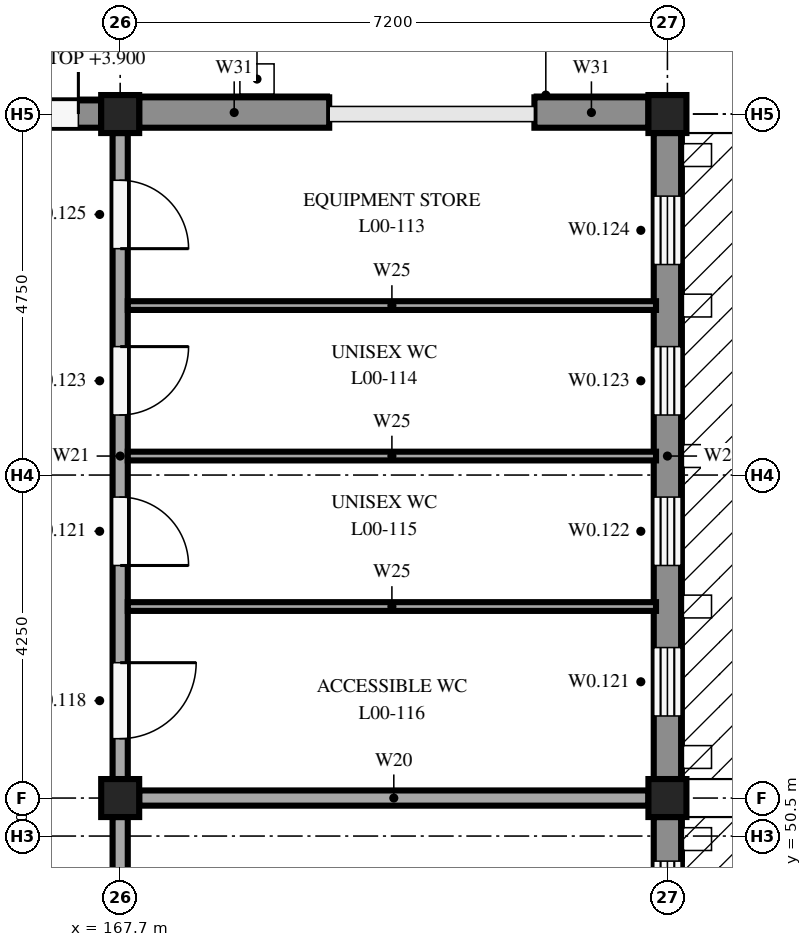
"""IFC4 building model, lengths in metres.
Left out: names, types, materials, properties, quantities, classifications, styles, units other than length and angle.
Written with IfcOpenShell. Run it as: python <this file> out.ifc"""

import sys

from ifc_helpers import new_model, si_unit, direction, frame, frame_2d, origin, origin_2d, place, context, subcontext, project, spatial, rectangle, extrude, element, fill, save


model = new_model("IFC4")
c1 = context("Model", 3, precision=1e-05, world=origin(), true_north=direction((0.0, 1.0)))
c2 = subcontext(c1, "Body", "Model", "MODEL_VIEW")
j1 = project(units=[si_unit("LENGTHUNIT", "METRE"), si_unit("PLANEANGLEUNIT", "RADIAN")], contexts=[c1])
p1 = place(None, origin())
s1 = spatial("IfcSite", under=j1, at=p1, CompositionType="ELEMENT")
p2 = place(p1, origin())
s2 = spatial("IfcBuilding", under=s1, at=p2, CompositionType="ELEMENT")
p3 = place(p2, origin())
s3 = spatial("IfcBuildingStorey", under=s2, at=p3, CompositionType="ELEMENT", Elevation=0.0)
for number, where, z_axis, x_axis in (
    (1, (167.7, 51.0, 0.0), (0.0, 0.0, 1.0), (1.0, 0.0, 0.0)),
    (2, (167.7, 60.0, 0.0), (0.0, 0.0, 1.0), (1.0, 0.0, 0.0)),
    (3, (174.9, 51.0, 0.0), (0.0, 0.0, 1.0), (1.0, 0.0, 0.0)),
    (4, (174.9, 60.0, 0.0), (0.0, 0.0, 1.0), (1.0, 0.0, 0.0)),
):
    element("IfcColumn", number, at=place(p3, frame(where, z_axis=z_axis, x_axis=x_axis)), inside=s3, PredefinedType="COLUMN", context=c2, shape_type="SweptSolid", body=[
        extrude(rectangle(XDim=0.5, YDim=0.5, at=origin_2d()), origin(), (0.0, 0.0, 1.0), 4.25),
    ])
p4 = place(p3, frame((174.9, 50.75, 0.0), z_axis=(0.0, 0.0, 1.0), x_axis=(0.0, -1.0, 0.0)))
e5 = element("IfcWall", 5, at=p4, inside=s3, PredefinedType="STANDARD", context=c2, shape_type="SweptSolid", body=[
    extrude(rectangle(XDim=8.5, YDim=0.36, at=frame_2d((4.25, 0.0))), origin(), (0.0, 0.0, 1.0), 3.75),
])
p5 = place(p4, frame((6.52, 0.0, 0.6)))
e6 = element("IfcOpeningElement", 6, at=p5, cuts=e5, PredefinedType="OPENING", context=c2, shape_type="SweptSolid", body=[
    extrude(rectangle(XDim=1.4, YDim=3.0, at=frame_2d((0.7, 1.5))), frame((0.0, 0.19, 0.0), z_axis=(0.0, -1.0, 0.0), x_axis=(1.0, 0.0, 0.0)), (0.0, 0.0, 1.0), 0.38),
])
p6 = place(p4, frame((4.54, 0.0, 0.6)))
e7 = element("IfcOpeningElement", 7, at=p6, cuts=e5, PredefinedType="OPENING", context=c2, shape_type="SweptSolid", body=[
    extrude(rectangle(XDim=1.4, YDim=3.0, at=frame_2d((0.7, 1.5))), frame((0.0, 0.19, 0.0), z_axis=(0.0, -1.0, 0.0), x_axis=(1.0, 0.0, 0.0)), (0.0, 0.0, 1.0), 0.38),
])
p7 = place(p4, frame((2.56, 0.0, 0.6)))
e8 = element("IfcOpeningElement", 8, at=p7, cuts=e5, PredefinedType="OPENING", context=c2, shape_type="SweptSolid", body=[
    extrude(rectangle(XDim=1.4, YDim=3.0, at=frame_2d((0.7, 1.5))), frame((0.0, 0.19, 0.0), z_axis=(0.0, -1.0, 0.0), x_axis=(1.0, 0.0, 0.0)), (0.0, 0.0, 1.0), 0.38),
])
p8 = place(p4, frame((0.58, 0.0, 0.6)))
e9 = element("IfcOpeningElement", 9, at=p8, cuts=e5, PredefinedType="OPENING", context=c2, shape_type="SweptSolid", body=[
    extrude(rectangle(XDim=1.4, YDim=3.0, at=frame_2d((0.7, 1.5))), frame((0.0, 0.19, 0.0), z_axis=(0.0, -1.0, 0.0), x_axis=(1.0, 0.0, 0.0)), (0.0, 0.0, 1.0), 0.38),
])
p9 = place(p3, frame((174.9, 59.75, 0.0), z_axis=(0.0, 0.0, 1.0), x_axis=(0.0, -1.0, 0.0)))
e10 = element("IfcWall", 10, at=p9, inside=s3, PredefinedType="STANDARD", context=c2, shape_type="SweptSolid", body=[
    extrude(rectangle(XDim=8.5, YDim=0.36, at=frame_2d((4.25, 0.0))), origin(), (0.0, 0.0, 1.0), 3.75),
])
p10 = place(p9, frame((6.77, 0.0, 1.6)))
e11 = element("IfcOpeningElement", 11, at=p10, cuts=e10, PredefinedType="OPENING", context=c2, shape_type="SweptSolid", body=[
    extrude(rectangle(XDim=0.9, YDim=1.0, at=frame_2d((0.45, 0.5))), frame((0.0, 0.19, 0.0), z_axis=(0.0, -1.0, 0.0), x_axis=(1.0, 0.0, 0.0)), (0.0, 0.0, 1.0), 0.38),
])
p11 = place(p9, frame((4.79, 0.0, 1.6)))
e12 = element("IfcOpeningElement", 12, at=p11, cuts=e10, PredefinedType="OPENING", context=c2, shape_type="SweptSolid", body=[
    extrude(rectangle(XDim=0.9, YDim=1.0, at=frame_2d((0.45, 0.5))), frame((0.0, 0.19, 0.0), z_axis=(0.0, -1.0, 0.0), x_axis=(1.0, 0.0, 0.0)), (0.0, 0.0, 1.0), 0.38),
])
p12 = place(p9, frame((2.81, 0.0, 1.6)))
e13 = element("IfcOpeningElement", 13, at=p12, cuts=e10, PredefinedType="OPENING", context=c2, shape_type="SweptSolid", body=[
    extrude(rectangle(XDim=0.9, YDim=1.0, at=frame_2d((0.45, 0.5))), frame((0.0, 0.19, 0.0), z_axis=(0.0, -1.0, 0.0), x_axis=(1.0, 0.0, 0.0)), (0.0, 0.0, 1.0), 0.38),
])
p13 = place(p9, frame((0.83, 0.0, 1.6)))
e14 = element("IfcOpeningElement", 14, at=p13, cuts=e10, PredefinedType="OPENING", context=c2, shape_type="SweptSolid", body=[
    extrude(rectangle(XDim=0.9, YDim=1.0, at=frame_2d((0.45, 0.5))), frame((0.0, 0.19, 0.0), z_axis=(0.0, -1.0, 0.0), x_axis=(1.0, 0.0, 0.0)), (0.0, 0.0, 1.0), 0.38),
])
p14 = place(p3, frame((165.25, 60.0, 0.0), z_axis=(0.0, 0.0, 1.0), x_axis=(1.0, 0.0, 0.0)))
e15 = element("IfcWall", 15, at=p14, inside=s3, PredefinedType="STANDARD", context=c2, shape_type="SweptSolid", body=[
    extrude(rectangle(XDim=2.2, YDim=0.36, at=frame_2d((1.1, 0.0))), origin(), (0.0, 0.0, 1.0), 3.9),
])
p15 = place(p14, frame((0.3, 0.0, 0.0)))
e16 = element("IfcOpeningElement", 16, at=p15, cuts=e15, PredefinedType="OPENING", context=c2, shape_type="SweptSolid", body=[
    extrude(rectangle(XDim=1.6, YDim=2.1, at=frame_2d((0.8, 1.05))), frame((0.0, 0.19, 0.0), z_axis=(0.0, -1.0, 0.0), x_axis=(1.0, 0.0, 0.0)), (0.0, 0.0, 1.0), 0.38),
])
p16 = place(p3, frame((167.95, 60.02, 0.0), z_axis=(0.0, 0.0, 1.0), x_axis=(1.0, 0.0, 0.0)))
e17 = element("IfcWall", 17, at=p16, inside=s3, PredefinedType="STANDARD", context=c2, shape_type="SweptSolid", body=[
    extrude(rectangle(XDim=2.5, YDim=0.4, at=frame_2d((1.25, 0.0))), origin(), (0.0, 0.0, 1.0), 3.8),
])
p17 = place(p3, frame((173.15, 60.02, 0.0), z_axis=(0.0, 0.0, 1.0), x_axis=(1.0, 0.0, 0.0)))
e18 = element("IfcWall", 18, at=p17, inside=s3, PredefinedType="STANDARD", context=c2, shape_type="SweptSolid", body=[
    extrude(rectangle(XDim=1.5, YDim=0.4, at=frame_2d((0.75, 0.0))), origin(), (0.0, 0.0, 1.0), 3.8),
])
p18 = place(p3, frame((167.7, 59.75, 0.0), z_axis=(0.0, 0.0, 1.0), x_axis=(0.0, -1.0, 0.0)))
e19 = element("IfcWall", 19, at=p18, inside=s3, PredefinedType="PARTITIONING", context=c2, shape_type="SweptSolid", body=[
    extrude(rectangle(XDim=8.5, YDim=0.2, at=frame_2d((4.25, 0.0))), origin(), (0.0, 0.0, 1.0), 3.8),
])
p19 = place(p18, frame((6.969, 0.0, 0.0)))
e20 = element("IfcOpeningElement", 20, at=p19, cuts=e19, PredefinedType="OPENING", context=c2, shape_type="SweptSolid", body=[
    extrude(rectangle(XDim=1.0, YDim=2.1, at=frame_2d((0.5, 1.05))), frame((0.0, 0.11, 0.0), z_axis=(0.0, -1.0, 0.0), x_axis=(1.0, 0.0, 0.0)), (0.0, 0.0, 1.0), 0.22),
])
p20 = place(p18, frame((4.79, 0.0, 0.0)))
e21 = element("IfcOpeningElement", 21, at=p20, cuts=e19, PredefinedType="OPENING", context=c2, shape_type="SweptSolid", body=[
    extrude(rectangle(XDim=0.9, YDim=2.1, at=frame_2d((0.45, 1.05))), frame((0.0, 0.11, 0.0), z_axis=(0.0, -1.0, 0.0), x_axis=(1.0, 0.0, 0.0)), (0.0, 0.0, 1.0), 0.22),
])
p21 = place(p18, frame((2.81, 0.0, 0.0)))
e22 = element("IfcOpeningElement", 22, at=p21, cuts=e19, PredefinedType="OPENING", context=c2, shape_type="SweptSolid", body=[
    extrude(rectangle(XDim=0.9, YDim=2.1, at=frame_2d((0.45, 1.05))), frame((0.0, 0.11, 0.0), z_axis=(0.0, -1.0, 0.0), x_axis=(1.0, 0.0, 0.0)), (0.0, 0.0, 1.0), 0.22),
])
p22 = place(p18, frame((0.621, 0.0, 0.0)))
e23 = element("IfcOpeningElement", 23, at=p22, cuts=e19, PredefinedType="OPENING", context=c2, shape_type="SweptSolid", body=[
    extrude(rectangle(XDim=0.9, YDim=2.1, at=frame_2d((0.45, 1.05))), frame((0.0, 0.11, 0.0), z_axis=(0.0, -1.0, 0.0), x_axis=(1.0, 0.0, 0.0)), (0.0, 0.0, 1.0), 0.22),
])
p23 = place(p3, frame((167.95, 51.0, 0.0), z_axis=(0.0, 0.0, 1.0), x_axis=(1.0, 0.0, 0.0)))
e24 = element("IfcWall", 24, at=p23, inside=s3, PredefinedType="PARTITIONING", context=c2, shape_type="SweptSolid", body=[
    extrude(rectangle(XDim=6.7, YDim=0.2, at=frame_2d((3.35, 0.0))), origin(), (0.0, 0.0, 1.0), 3.8),
])
for number, where, z_axis, x_axis in (
    (25, (167.8, 57.48, 0.0), (0.0, 0.0, 1.0), (1.0, 0.0, 0.0)),
    (26, (167.8, 55.5, 0.0), (0.0, 0.0, 1.0), (1.0, 0.0, 0.0)),
    (27, (167.8, 53.52, 0.0), (0.0, 0.0, 1.0), (1.0, 0.0, 0.0)),
):
    element("IfcWall", number, at=place(p3, frame(where, z_axis=z_axis, x_axis=x_axis)), inside=s3, PredefinedType="PARTITIONING", context=c2, shape_type="SweptSolid", body=[
        extrude(rectangle(XDim=6.95, YDim=0.115, at=frame_2d((3.475, 0.0))), origin(), (0.0, 0.0, 1.0), 4.25),
    ])
p24 = place(p3, frame((167.7, 50.75, 0.0), z_axis=(0.0, 0.0, 1.0), x_axis=(0.0, -1.0, 0.0)))
e28 = element("IfcWall", 28, at=p24, inside=s3, PredefinedType="PARTITIONING", context=c2, shape_type="SweptSolid", body=[
    extrude(rectangle(XDim=8.5, YDim=0.2, at=frame_2d((4.25, 0.0))), origin(), (0.0, 0.0, 1.0), 3.8),
])
p25 = place(p24, frame((3.75, 0.0, 0.0)))
e29 = element("IfcOpeningElement", 29, at=p25, cuts=e28, PredefinedType="OPENING", context=c2, shape_type="SweptSolid", body=[
    extrude(rectangle(XDim=1.0, YDim=2.1, at=frame_2d((0.5, 1.05))), frame((0.0, 0.11, 0.0), z_axis=(0.0, -1.0, 0.0), x_axis=(1.0, 0.0, 0.0)), (0.0, 0.0, 1.0), 0.22),
])
p26 = place(p8, origin())
e30 = element("IfcWindow", 30, at=p26, inside=s3, PartitioningType="DOUBLE_PANEL_VERTICAL", PredefinedType="WINDOW", context=c2, shape_type="SweptSolid", body=[
    extrude(rectangle(XDim=1.4, YDim=3.0, at=frame_2d((0.7, 1.5))), frame((0.0, 0.03, 0.0), z_axis=(0.0, -1.0, 0.0), x_axis=(1.0, 0.0, 0.0)), (0.0, 0.0, 1.0), 0.06),
])
fill(e9, e30)
p27 = place(p10, origin())
e31 = element("IfcWindow", 31, at=p27, inside=s3, PartitioningType="SINGLE_PANEL", PredefinedType="WINDOW", context=c2, shape_type="SweptSolid", body=[
    extrude(rectangle(XDim=0.9, YDim=1.0, at=frame_2d((0.45, 0.5))), frame((0.0, 0.03, 0.0), z_axis=(0.0, -1.0, 0.0), x_axis=(1.0, 0.0, 0.0)), (0.0, 0.0, 1.0), 0.06),
])
fill(e11, e31)
p28 = place(p11, origin())
e32 = element("IfcWindow", 32, at=p28, inside=s3, PartitioningType="SINGLE_PANEL", PredefinedType="WINDOW", context=c2, shape_type="SweptSolid", body=[
    extrude(rectangle(XDim=0.9, YDim=1.0, at=frame_2d((0.45, 0.5))), frame((0.0, 0.03, 0.0), z_axis=(0.0, -1.0, 0.0), x_axis=(1.0, 0.0, 0.0)), (0.0, 0.0, 1.0), 0.06),
])
fill(e12, e32)
p29 = place(p12, origin())
e33 = element("IfcWindow", 33, at=p29, inside=s3, PartitioningType="SINGLE_PANEL", PredefinedType="WINDOW", context=c2, shape_type="SweptSolid", body=[
    extrude(rectangle(XDim=0.9, YDim=1.0, at=frame_2d((0.45, 0.5))), frame((0.0, 0.03, 0.0), z_axis=(0.0, -1.0, 0.0), x_axis=(1.0, 0.0, 0.0)), (0.0, 0.0, 1.0), 0.06),
])
fill(e13, e33)
p30 = place(p13, origin())
e34 = element("IfcWindow", 34, at=p30, inside=s3, PartitioningType="SINGLE_PANEL", PredefinedType="WINDOW", context=c2, shape_type="SweptSolid", body=[
    extrude(rectangle(XDim=0.9, YDim=1.0, at=frame_2d((0.45, 0.5))), frame((0.0, 0.03, 0.0), z_axis=(0.0, -1.0, 0.0), x_axis=(1.0, 0.0, 0.0)), (0.0, 0.0, 1.0), 0.06),
])
fill(e14, e34)
p31 = place(p15, origin())
e35 = element("IfcDoor", 35, at=p31, inside=s3, OperationType="DOUBLE_DOOR_SINGLE_SWING", PredefinedType="DOOR", context=c2, shape_type="SweptSolid", body=[
    extrude(rectangle(XDim=1.6, YDim=2.1, at=frame_2d((0.8, 1.05))), frame((0.0, 0.025, 0.0), z_axis=(0.0, -1.0, 0.0), x_axis=(1.0, 0.0, 0.0)), (0.0, 0.0, 1.0), 0.05),
])
fill(e16, e35)
p32 = place(p19, origin())
e36 = element("IfcDoor", 36, at=p32, inside=s3, OperationType="SINGLE_SWING_LEFT", PredefinedType="DOOR", context=c2, shape_type="SweptSolid", body=[
    extrude(rectangle(XDim=1.0, YDim=2.1, at=frame_2d((0.5, 1.05))), frame((0.0, 0.025, 0.0), z_axis=(0.0, -1.0, 0.0), x_axis=(1.0, 0.0, 0.0)), (0.0, 0.0, 1.0), 0.05),
])
fill(e20, e36)
p33 = place(p20, origin())
e37 = element("IfcDoor", 37, at=p33, inside=s3, OperationType="SINGLE_SWING_RIGHT", PredefinedType="DOOR", context=c2, shape_type="SweptSolid", body=[
    extrude(rectangle(XDim=0.9, YDim=2.1, at=frame_2d((0.45, 1.05))), frame((0.0, 0.025, 0.0), z_axis=(0.0, -1.0, 0.0), x_axis=(1.0, 0.0, 0.0)), (0.0, 0.0, 1.0), 0.05),
])
fill(e21, e37)
p34 = place(p21, origin())
e38 = element("IfcDoor", 38, at=p34, inside=s3, OperationType="SINGLE_SWING_LEFT", PredefinedType="DOOR", context=c2, shape_type="SweptSolid", body=[
    extrude(rectangle(XDim=0.9, YDim=2.1, at=frame_2d((0.45, 1.05))), frame((0.0, 0.025, 0.0), z_axis=(0.0, -1.0, 0.0), x_axis=(1.0, 0.0, 0.0)), (0.0, 0.0, 1.0), 0.05),
])
fill(e22, e38)
p35 = place(p22, origin())
e39 = element("IfcDoor", 39, at=p35, inside=s3, OperationType="SINGLE_SWING_RIGHT", PredefinedType="DOOR", context=c2, shape_type="SweptSolid", body=[
    extrude(rectangle(XDim=0.9, YDim=2.1, at=frame_2d((0.45, 1.05))), frame((0.0, 0.025, 0.0), z_axis=(0.0, -1.0, 0.0), x_axis=(1.0, 0.0, 0.0)), (0.0, 0.0, 1.0), 0.05),
])
fill(e23, e39)
save(model, sys.argv[1])
